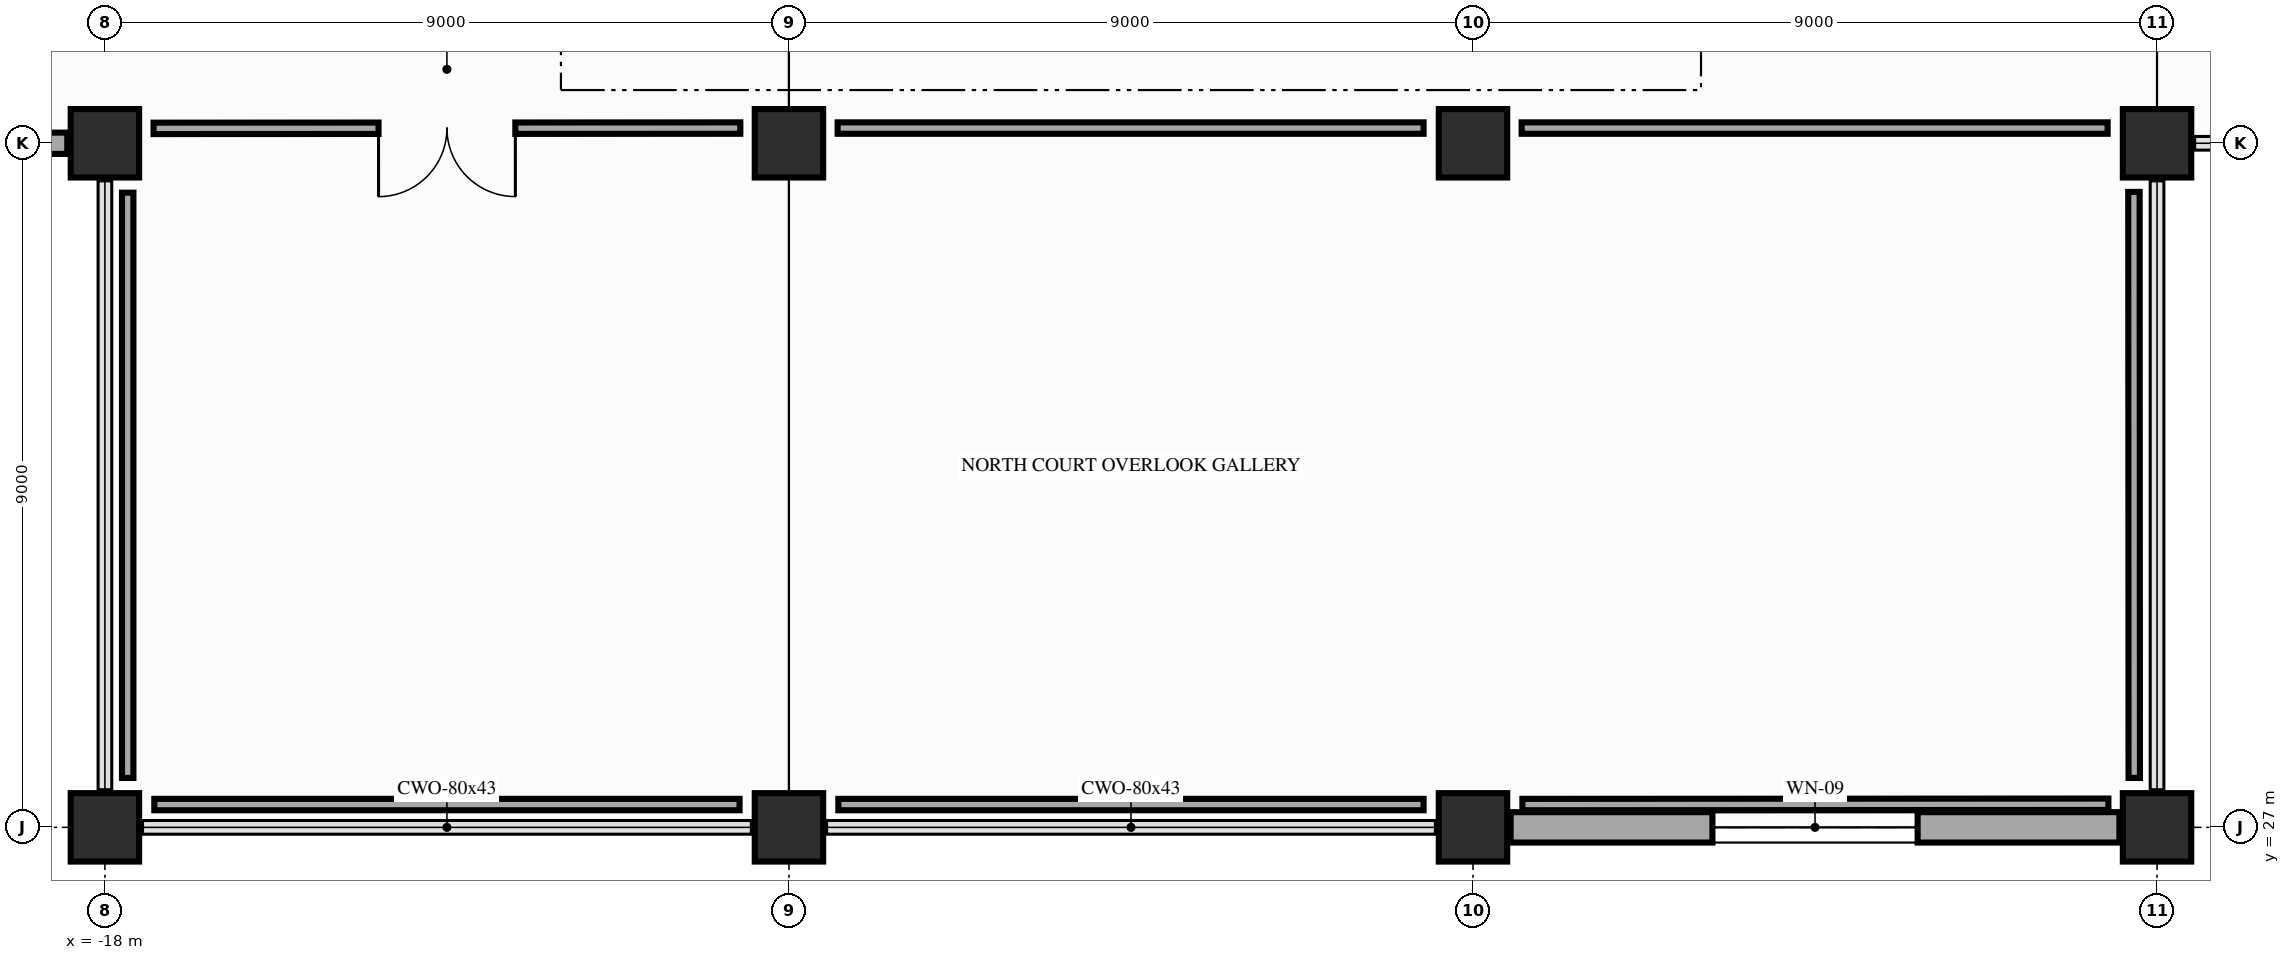
"""IFC4 building model, lengths in metres.
Left out: names, types, materials, properties, quantities, classifications, styles, units other than length and angle.
Written with IfcOpenShell. Run it as: python <this file> out.ifc"""

import sys

from ifc_helpers import new_model, si_unit, direction, frame, frame_2d, origin, origin_2d, place, context, subcontext, project, spatial, rectangle, extrude, element, fill, save


model = new_model("IFC4")
c1 = context("Model", 3, precision=1e-05, world=origin(), true_north=direction((0.0, 1.0)))
c2 = subcontext(c1, "Body", "Model", "MODEL_VIEW")
j1 = project(units=[si_unit("LENGTHUNIT", "METRE"), si_unit("PLANEANGLEUNIT", "RADIAN")], contexts=[c1])
p1 = place(None, origin())
s1 = spatial("IfcSite", under=j1, at=p1, CompositionType="ELEMENT")
p2 = place(p1, origin())
s2 = spatial("IfcBuilding", under=s1, at=p2, CompositionType="ELEMENT")
p3 = place(p2, frame((0.0, 0.0, 5.4)))
s3 = spatial("IfcBuildingStorey", under=s2, at=p3, CompositionType="ELEMENT", Elevation=5.4)
for number, where, z_axis, x_axis in (
    (1, (-18.0, 27.0, 0.0), (0.0, 0.0, 1.0), (1.0, 0.0, 0.0)),
    (2, (-18.0, 36.0, 0.0), (0.0, 0.0, 1.0), (1.0, 0.0, 0.0)),
    (3, (-9.0, 27.0, 0.0), (0.0, 0.0, 1.0), (1.0, 0.0, 0.0)),
    (4, (-9.0, 36.0, 0.0), (0.0, 0.0, 1.0), (1.0, 0.0, 0.0)),
    (5, (0.0, 27.0, 0.0), (0.0, 0.0, 1.0), (1.0, 0.0, 0.0)),
    (6, (0.0, 36.0, 0.0), (0.0, 0.0, 1.0), (1.0, 0.0, 0.0)),
    (7, (9.0, 27.0, 0.0), (0.0, 0.0, 1.0), (1.0, 0.0, 0.0)),
    (8, (9.0, 36.0, 0.0), (0.0, 0.0, 1.0), (1.0, 0.0, 0.0)),
):
    element("IfcColumn", number, at=place(p3, frame(where, z_axis=z_axis, x_axis=x_axis)), inside=s3, PredefinedType="COLUMN", context=c2, shape_type="SweptSolid", body=[
        extrude(rectangle(XDim=0.9, YDim=0.9, at=origin_2d()), origin(), (0.0, 0.0, 1.0), 5.4),
    ])
p4 = place(p3, frame((-18.495, 36.0, 0.0), z_axis=(0.0, 0.0, 1.0), x_axis=(-1.0, 0.0, 0.0)))
e9 = element("IfcWall", 9, at=p4, inside=s3, PredefinedType="SOLIDWALL", context=c2, shape_type="SweptSolid", body=[
    extrude(rectangle(XDim=8.01, YDim=0.28, at=frame_2d((4.005, 0.0))), origin(), (0.0, 0.0, 1.0), 4.375),
])
p5 = place(p4, frame((3.105, 0.0, 0.9)))
e10 = element("IfcOpeningElement", 10, at=p5, cuts=e9, PredefinedType="OPENING", context=c2, shape_type="SweptSolid", body=[
    extrude(rectangle(XDim=1.8, YDim=2.2, at=frame_2d((0.9, 1.1))), frame((0.0, 0.15, 0.0), z_axis=(0.0, -1.0, 0.0), x_axis=(1.0, 0.0, 0.0)), (0.0, 0.0, 1.0), 0.3),
])
p6 = place(p3, frame((8.505, 27.0, 0.0), z_axis=(0.0, 0.0, 1.0), x_axis=(-1.0, 0.0, 0.0)))
e11 = element("IfcWall", 11, at=p6, inside=s3, PredefinedType="SOLIDWALL", context=c2, shape_type="SweptSolid", body=[
    extrude(rectangle(XDim=8.01, YDim=0.4, at=frame_2d((4.005, 0.0))), origin(), (0.0, 0.0, 1.0), 3.815),
])
p7 = place(p6, frame((2.655, 0.0, 0.9)))
e12 = element("IfcOpeningElement", 12, at=p7, cuts=e11, PredefinedType="OPENING", context=c2, shape_type="SweptSolid", body=[
    extrude(rectangle(XDim=2.7, YDim=2.2, at=frame_2d((1.35, 1.1))), frame((0.0, 0.21, 0.0), z_axis=(0.0, -1.0, 0.0), x_axis=(1.0, 0.0, 0.0)), (0.0, 0.0, 1.0), 0.42),
])
for number, where, z_axis, x_axis in (
    (13, (-17.35, 27.3, 0.0), (0.0, 0.0, 1.0), (1.0, 0.0, 0.0)),
    (14, (-8.35, 27.3, 0.0), (0.0, 0.0, 1.0), (1.0, 0.0, 0.0)),
):
    element("IfcWall", number, at=place(p3, frame(where, z_axis=z_axis, x_axis=x_axis)), inside=s3, PredefinedType="PARTITIONING", context=c2, shape_type="SweptSolid", body=[
        extrude(rectangle(XDim=7.7, YDim=0.15, at=frame_2d((3.85, 0.0))), origin(), (0.0, 0.0, 1.0), 4.375),
    ])
p8 = place(p3, frame((0.65, 27.3, 0.0), z_axis=(0.0, 0.0, 1.0), x_axis=(0.999999871661, 0.00050663367, 0.0)))
e15 = element("IfcWall", 15, at=p8, inside=s3, PredefinedType="PARTITIONING", context=c2, shape_type="SweptSolid", body=[
    extrude(rectangle(XDim=7.71, YDim=0.15, at=frame_2d((3.855, 0.0))), origin(), (0.0, 0.0, 1.0), 4.375),
])
p9 = place(p3, frame((8.7, 27.65, 0.0), z_axis=(0.0, 0.0, 1.0), x_axis=(-0.00050663367, 0.999999871661, 0.0)))
e16 = element("IfcWall", 16, at=p9, inside=s3, PredefinedType="PARTITIONING", context=c2, shape_type="SweptSolid", body=[
    extrude(rectangle(XDim=7.71, YDim=0.15, at=frame_2d((3.855, 0.0))), origin(), (0.0, 0.0, 1.0), 4.425),
])
for number, where, z_axis, x_axis in (
    (17, (8.35, 36.2, 0.0), (0.0, 0.0, 1.0), (-1.0, 0.0, 0.0)),
    (18, (-0.65, 36.2, 0.0), (0.0, 0.0, 1.0), (-1.0, 0.0, 0.0)),
):
    element("IfcWall", number, at=place(p3, frame(where, z_axis=z_axis, x_axis=x_axis)), inside=s3, PredefinedType="PARTITIONING", context=c2, shape_type="SweptSolid", body=[
        extrude(rectangle(XDim=7.71, YDim=0.15, at=frame_2d((3.855, 0.0))), origin(), (0.0, 0.0, 1.0), 4.375),
    ])
p10 = place(p3, frame((-9.64, 36.2, 0.0), z_axis=(0.0, 0.0, 1.0), x_axis=(-0.999999871994, -0.000505976787, 0.0)))
e19 = element("IfcWall", 19, at=p10, inside=s3, PredefinedType="PARTITIONING", context=c2, shape_type="SweptSolid", body=[
    extrude(rectangle(XDim=7.72, YDim=0.15, at=frame_2d((3.86, 0.0))), origin(), (0.0, 0.0, 1.0), 4.375),
])
p11 = place(p10, frame((2.96, 0.0, 0.0)))
e20 = element("IfcOpeningElement", 20, at=p11, cuts=e19, PredefinedType="OPENING", context=c2, shape_type="SweptSolid", body=[
    extrude(rectangle(XDim=1.8, YDim=2.3, at=frame_2d((0.9, 1.15))), frame((0.0, 0.085, 0.0), z_axis=(0.0, -1.0, 0.0), x_axis=(1.0, 0.0, 0.0)), (0.0, 0.0, 1.0), 0.17),
])
p12 = place(p3, frame((-17.7, 35.35, 0.0), z_axis=(0.0, 0.0, 1.0), x_axis=(0.0, -1.0, 0.0)))
e21 = element("IfcWall", 21, at=p12, inside=s3, PredefinedType="PARTITIONING", context=c2, shape_type="SweptSolid", body=[
    extrude(rectangle(XDim=7.7, YDim=0.15, at=frame_2d((3.85, 0.0))), origin(), (0.0, 0.0, 1.0), 4.425),
])
p13 = place(p7, origin())
e22 = element("IfcWindow", 22, at=p13, inside=s3, PartitioningType="SINGLE_PANEL", PredefinedType="WINDOW", context=c2, shape_type="SweptSolid", body=[
    extrude(rectangle(XDim=2.7, YDim=2.2, at=frame_2d((1.35, 1.1))), frame((0.0, 0.03, 0.0), z_axis=(0.0, -1.0, 0.0), x_axis=(1.0, 0.0, 0.0)), (0.0, 0.0, 1.0), 0.06),
])
fill(e12, e22)
p14 = place(p11, origin())
e23 = element("IfcDoor", 23, at=p14, inside=s3, OperationType="DOUBLE_DOOR_SINGLE_SWING", PredefinedType="DOOR", context=c2, shape_type="SweptSolid", body=[
    extrude(rectangle(XDim=1.8, YDim=2.3, at=frame_2d((0.9, 1.15))), frame((0.0, 0.025, 0.0), z_axis=(0.0, -1.0, 0.0), x_axis=(1.0, 0.0, 0.0)), (0.0, 0.0, 1.0), 0.05),
])
fill(e20, e23)
save(model, sys.argv[1])
